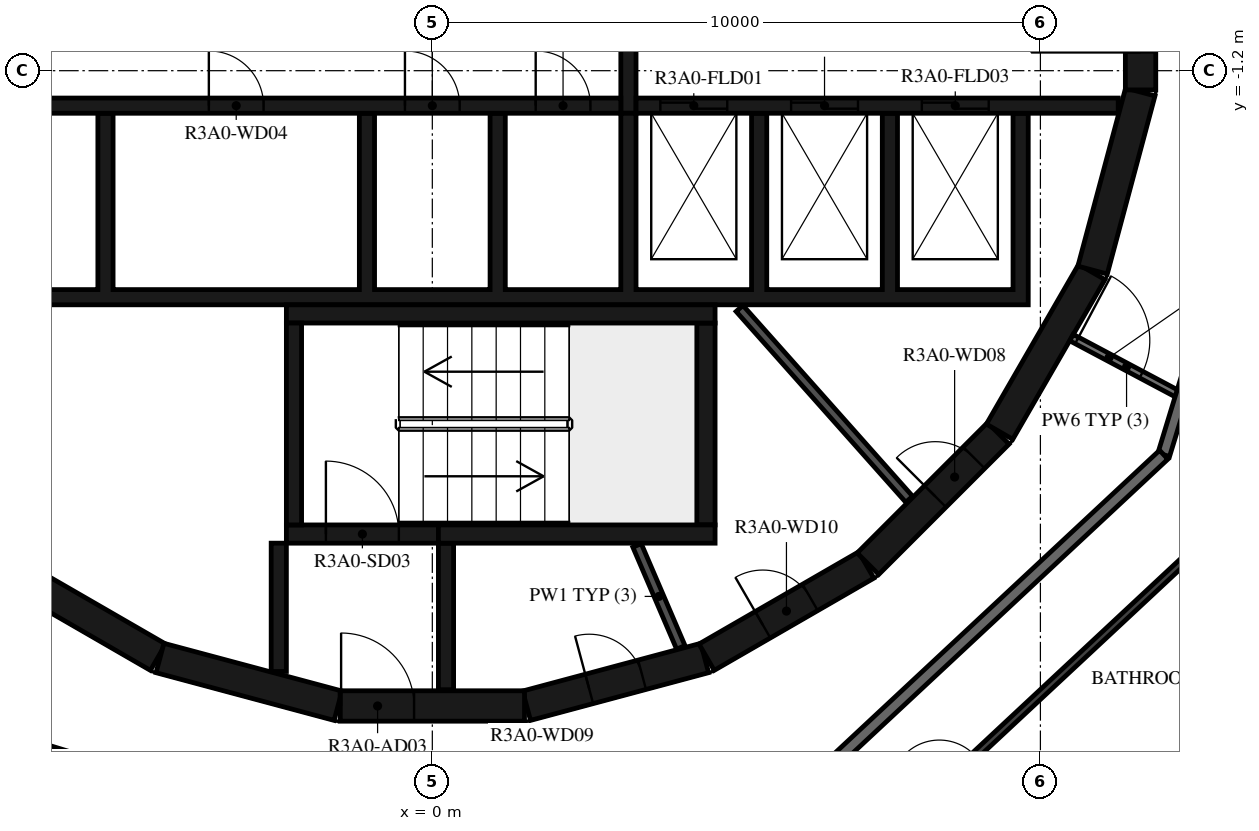
"""IFC4 building model, lengths in metres.
Left out: names, types, materials, properties, quantities, classifications, styles, units other than length and angle.
Written with IfcOpenShell. Run it as: python <this file> out.ifc"""

import sys

from ifc_helpers import new_model, si_unit, direction, frame, frame_2d, origin, place, context, subcontext, project, spatial, polyline, rectangle, outline, extrude, element, fill, save


model = new_model("IFC4")
c1 = context("Model", 3, precision=1e-05, world=origin(), true_north=direction((0.0, 1.0)))
c2 = subcontext(c1, "Body", "Model", "MODEL_VIEW")
j1 = project(units=[si_unit("LENGTHUNIT", "METRE"), si_unit("PLANEANGLEUNIT", "RADIAN")], contexts=[c1])
p1 = place(None, origin())
s1 = spatial("IfcSite", under=j1, at=p1, CompositionType="ELEMENT")
p2 = place(p1, origin())
s2 = spatial("IfcBuilding", under=s1, at=p2, CompositionType="ELEMENT")
p3 = place(p2, frame((0.0, 0.0, 120.4)))
s3 = spatial("IfcBuildingStorey", under=s2, at=p3, CompositionType="ELEMENT", Elevation=120.4)
p4 = place(p3, frame((1.55, -11.643, 0.0), z_axis=(0.0, 0.0, 1.0), x_axis=(0.965948410781, 0.258734743916, 0.0)))
e1 = element("IfcWall", 1, at=p4, inside=s3, PredefinedType="SHEAR", context=c2, shape_type="SweptSolid", body=[
    extrude(rectangle(XDim=3.033, YDim=0.5, at=frame_2d((1.516, 0.0))), origin(), (0.0, 0.0, 1.0), 3.12),
])
p5 = place(p4, frame((1.066, 0.0, 0.0)))
e2 = element("IfcOpeningElement", 2, at=p5, cuts=e1, PredefinedType="OPENING", context=c2, shape_type="SweptSolid", body=[
    extrude(rectangle(XDim=0.9, YDim=2.1, at=frame_2d((0.45, 1.05))), frame((0.0, 0.26, 0.0), z_axis=(0.0, -1.0, 0.0), x_axis=(1.0, 0.0, 0.0)), (0.0, 0.0, 1.0), 0.52),
])
p6 = place(p3, frame((4.51, -10.845, 0.0), z_axis=(0.0, 0.0, 1.0), x_axis=(0.865975092491, 0.500087131594, 0.0)))
e3 = element("IfcWall", 3, at=p6, inside=s3, PredefinedType="SHEAR", context=c2, shape_type="SweptSolid", body=[
    extrude(rectangle(XDim=3.033, YDim=0.5, at=frame_2d((1.516, 0.0))), origin(), (0.0, 0.0, 1.0), 3.12),
])
p7 = place(p6, frame((1.066, 0.0, 0.0)))
e4 = element("IfcOpeningElement", 4, at=p7, cuts=e3, PredefinedType="OPENING", context=c2, shape_type="SweptSolid", body=[
    extrude(rectangle(XDim=0.9, YDim=2.1, at=frame_2d((0.45, 1.05))), frame((0.0, 0.26, 0.0), z_axis=(0.0, -1.0, 0.0), x_axis=(1.0, 0.0, 0.0)), (0.0, 0.0, 1.0), 0.52),
])
p8 = place(p3, frame((7.164, -9.308, 0.0), z_axis=(0.0, 0.0, 1.0), x_axis=(0.707106781187, 0.707106781187, 0.0)))
e5 = element("IfcWall", 5, at=p8, inside=s3, PredefinedType="SHEAR", context=c2, shape_type="SweptSolid", body=[
    extrude(rectangle(XDim=3.032, YDim=0.5, at=frame_2d((1.516, 0.0))), origin(), (0.0, 0.0, 1.0), 3.12),
])
p9 = place(p8, frame((1.566, 0.0, 0.0)))
e6 = element("IfcOpeningElement", 6, at=p9, cuts=e5, PredefinedType="OPENING", context=c2, shape_type="SweptSolid", body=[
    extrude(rectangle(XDim=0.9, YDim=2.1, at=frame_2d((0.45, 1.05))), frame((0.0, 0.26, 0.0), z_axis=(0.0, -1.0, 0.0), x_axis=(1.0, 0.0, 0.0)), (0.0, 0.0, 1.0), 0.52),
])
for number, where, z_axis, x_axis in (
    (7, (9.329, -7.137, 0.0), (0.0, 0.0, 1.0), (0.5, 0.866, 0.0)),
    (8, (10.858, -4.479, 0.0), (0.0, 0.0, 1.0), (0.259, 0.966, 0.0)),
):
    element("IfcWall", number, at=place(p3, frame(where, z_axis=z_axis, x_axis=x_axis)), inside=s3, PredefinedType="SHEAR", context=c2, shape_type="SweptSolid", body=[
        extrude(rectangle(XDim=3.033, YDim=0.5, at=frame_2d((1.516, 0.0))), origin(), (0.0, 0.0, 1.0), 3.12),
    ])
p10 = place(p3, frame((11.647, -1.516, 0.0), z_axis=(0.0, 0.0, 1.0), x_axis=(0.0, 1.0, 0.0)))
e9 = element("IfcWall", 9, at=p10, inside=s3, PredefinedType="SHEAR", context=c2, shape_type="SweptSolid", body=[
    extrude(rectangle(XDim=3.033, YDim=0.5, at=frame_2d((1.516, 0.0))), origin(), (0.0, 0.0, 1.0), 3.12),
])
p11 = place(p10, frame((0.616, 0.0, 0.0)))
e10 = element("IfcOpeningElement", 10, at=p11, cuts=e9, PredefinedType="OPENING", context=c2, shape_type="SweptSolid", body=[
    extrude(rectangle(XDim=1.8, YDim=2.1, at=frame_2d((0.9, 1.05))), frame((0.0, 0.26, 0.0), z_axis=(0.0, -1.0, 0.0), x_axis=(1.0, 0.0, 0.0)), (0.0, 0.0, 1.0), 0.52),
])
for number, where, z_axis, x_axis in (
    (11, (-7.137, -9.329, 0.0), (0.0, 0.0, 1.0), (0.866, -0.5, 0.0)),
    (12, (-4.479, -10.858, 0.0), (0.0, 0.0, 1.0), (0.966, -0.259, 0.0)),
):
    element("IfcWall", number, at=place(p3, frame(where, z_axis=z_axis, x_axis=x_axis)), inside=s3, PredefinedType="SHEAR", context=c2, shape_type="SweptSolid", body=[
        extrude(rectangle(XDim=3.033, YDim=0.5, at=frame_2d((1.516, 0.0))), origin(), (0.0, 0.0, 1.0), 3.12),
    ])
p12 = place(p3, frame((-1.516, -11.647, 0.0), z_axis=(0.0, 0.0, 1.0), x_axis=(1.0, 0.0, 0.0)))
e13 = element("IfcWall", 13, at=p12, inside=s3, PredefinedType="SHEAR", context=c2, shape_type="SweptSolid", body=[
    extrude(rectangle(XDim=3.033, YDim=0.5, at=frame_2d((1.516, 0.0))), origin(), (0.0, 0.0, 1.0), 3.12),
])
p13 = place(p12, frame((0.016, 0.0, 0.0)))
e14 = element("IfcOpeningElement", 14, at=p13, cuts=e13, PredefinedType="OPENING", context=c2, shape_type="SweptSolid", body=[
    extrude(rectangle(XDim=1.2, YDim=2.1, at=frame_2d((0.6, 1.05))), frame((0.0, 0.26, 0.0), z_axis=(0.0, -1.0, 0.0), x_axis=(1.0, 0.0, 0.0)), (0.0, 0.0, 1.0), 0.52),
])
p14 = place(p3, frame((-2.275, -8.67, 0.0), z_axis=(0.0, 0.0, 1.0), x_axis=(0.0, 1.0, 0.0)))
e15 = element("IfcWall", 15, at=p14, inside=s3, PredefinedType="SHEAR", context=c2, shape_type="SweptSolid", body=[
    extrude(rectangle(XDim=3.32, YDim=0.25, at=frame_2d((1.66, 0.0))), origin(), (0.0, 0.0, 1.0), 3.12),
])
p15 = place(p3, frame((-2.4, -5.2, 0.0), z_axis=(0.0, 0.0, 1.0), x_axis=(1.0, 0.0, 0.0)))
e16 = element("IfcWall", 16, at=p15, inside=s3, PredefinedType="SHEAR", context=c2, shape_type="SweptSolid", body=[
    extrude(rectangle(XDim=7.05, YDim=0.3, at=frame_2d((3.525, 0.0))), origin(), (0.0, 0.0, 1.0), 3.12),
])
p16 = place(p3, frame((4.5, -8.67, 0.0), z_axis=(0.0, 0.0, 1.0), x_axis=(0.0, 1.0, 0.0)))
e17 = element("IfcWall", 17, at=p16, inside=s3, PredefinedType="SHEAR", context=c2, shape_type="SweptSolid", body=[
    extrude(rectangle(XDim=3.32, YDim=0.3, at=frame_2d((1.66, 0.0))), origin(), (0.0, 0.0, 1.0), 3.12),
])
p17 = place(p3, frame((0.1, -8.82, 0.0), z_axis=(0.0, 0.0, 1.0), x_axis=(1.0, 0.0, 0.0)))
e18 = element("IfcWall", 18, at=p17, inside=s3, PredefinedType="SHEAR", context=c2, shape_type="SweptSolid", body=[
    extrude(rectangle(XDim=4.55, YDim=0.3, at=frame_2d((2.275, 0.0))), origin(), (0.0, 0.0, 1.0), 3.12),
])
p18 = place(p3, frame((-2.4, -8.82, 0.0), z_axis=(0.0, 0.0, 1.0), x_axis=(1.0, 0.0, 0.0)))
e19 = element("IfcWall", 19, at=p18, inside=s3, PredefinedType="SHEAR", context=c2, shape_type="SweptSolid", body=[
    extrude(rectangle(XDim=2.5, YDim=0.3, at=frame_2d((1.25, 0.0))), origin(), (0.0, 0.0, 1.0), 3.12),
])
p19 = place(p18, frame((0.65, 0.0, 0.0)))
e20 = element("IfcOpeningElement", 20, at=p19, cuts=e19, PredefinedType="OPENING", context=c2, shape_type="SweptSolid", body=[
    extrude(rectangle(XDim=1.2, YDim=2.1, at=frame_2d((0.6, 1.05))), frame((0.0, 0.16, 0.0), z_axis=(0.0, -1.0, 0.0), x_axis=(1.0, 0.0, 0.0)), (0.0, 0.0, 1.0), 0.32),
])
p20 = place(p3, frame((-2.525, -8.97, 0.0), z_axis=(0.0, 0.0, 1.0), x_axis=(0.0, -1.0, 0.0)))
e21 = element("IfcWall", 21, at=p20, inside=s3, PredefinedType="SHEAR", context=c2, shape_type="SweptSolid", body=[
    extrude(rectangle(XDim=2.11, YDim=0.25, at=frame_2d((1.055, 0.0))), origin(), (0.0, 0.0, 1.0), 3.12),
])
p21 = place(p3, frame((0.225, -8.97, 0.0), z_axis=(0.0, 0.0, 1.0), x_axis=(0.0, -1.0, 0.0)))
e22 = element("IfcWall", 22, at=p21, inside=s3, PredefinedType="SHEAR", context=c2, shape_type="SweptSolid", body=[
    extrude(rectangle(XDim=2.41, YDim=0.25, at=frame_2d((1.205, 0.0))), origin(), (0.0, 0.0, 1.0), 3.12),
])
p22 = place(p3, origin())
e23 = element("IfcWall", 23, at=p22, inside=s3, PredefinedType="SHEAR", context=c2, shape_type="SweptSolid", body=[
    extrude(outline(polyline([(9.8, -5.05), (9.8, -4.8), (9.8, -1.9), (9.55, -1.9), (9.55, -4.8), (7.65, -4.8), (7.65, -1.9), (7.4, -1.9), (7.4, -4.8), (5.5, -4.8), (5.5, -1.9), (5.25, -1.9), (5.25, -4.8), (3.35, -4.8), (3.35, -1.9), (3.1, -1.9), (3.1, -4.8), (1.2, -4.8), (1.2, -1.9), (0.95, -1.9), (0.95, -4.8), (-0.95, -4.8), (-0.95, -1.9), (-1.2, -1.9), (-1.2, -4.8), (-5.25, -4.8), (-5.25, -1.9), (-5.5, -1.9), (-5.5, -4.8), (-7.4, -4.8), (-7.4, -1.9), (-7.65, -1.9), (-7.65, -4.8), (-9.55, -4.8), (-9.55, -1.9), (-9.8, -1.9), (-9.8, -4.8), (-9.8, -5.05), (9.8, -5.05)])), origin(), (0.0, 0.0, 1.0), 3.12),
])
p23 = place(p3, frame((-11.28, -1.775, 0.0), z_axis=(0.0, 0.0, 1.0), x_axis=(1.0, 0.0, 0.0)))
e24 = element("IfcWall", 24, at=p23, inside=s3, PredefinedType="SHEAR", context=c2, shape_type="SweptSolid", body=[
    extrude(rectangle(XDim=14.38, YDim=0.25, at=frame_2d((7.19, 0.0))), origin(), (0.0, 0.0, 1.0), 3.12),
])
p24 = place(p23, frame((7.605, 0.0, 0.0)))
e25 = element("IfcOpeningElement", 25, at=p24, cuts=e24, PredefinedType="OPENING", context=c2, shape_type="SweptSolid", body=[
    extrude(rectangle(XDim=0.9, YDim=2.1, at=frame_2d((0.45, 1.05))), frame((0.0, 0.135, 0.0), z_axis=(0.0, -1.0, 0.0), x_axis=(1.0, 0.0, 0.0)), (0.0, 0.0, 1.0), 0.27),
])
p25 = place(p23, frame((10.83, 0.0, 0.0)))
e26 = element("IfcOpeningElement", 26, at=p25, cuts=e24, PredefinedType="OPENING", context=c2, shape_type="SweptSolid", body=[
    extrude(rectangle(XDim=0.9, YDim=2.1, at=frame_2d((0.45, 1.05))), frame((0.0, 0.135, 0.0), z_axis=(0.0, -1.0, 0.0), x_axis=(1.0, 0.0, 0.0)), (0.0, 0.0, 1.0), 0.27),
])
p26 = place(p23, frame((12.98, 0.0, 0.0)))
e27 = element("IfcOpeningElement", 27, at=p26, cuts=e24, PredefinedType="OPENING", context=c2, shape_type="SweptSolid", body=[
    extrude(rectangle(XDim=0.9, YDim=2.1, at=frame_2d((0.45, 1.05))), frame((0.0, 0.135, 0.0), z_axis=(0.0, -1.0, 0.0), x_axis=(1.0, 0.0, 0.0)), (0.0, 0.0, 1.0), 0.27),
])
p27 = place(p3, frame((3.35, -1.775, 0.0), z_axis=(0.0, 0.0, 1.0), x_axis=(1.0, 0.0, 0.0)))
e28 = element("IfcWall", 28, at=p27, inside=s3, PredefinedType="SHEAR", context=c2, shape_type="SweptSolid", body=[
    extrude(rectangle(XDim=7.93, YDim=0.25, at=frame_2d((3.965, 0.0))), origin(), (0.0, 0.0, 1.0), 3.12),
])
p28 = place(p27, frame((0.4, 0.0, 0.0)))
e29 = element("IfcOpeningElement", 29, at=p28, cuts=e28, PredefinedType="OPENING", context=c2, shape_type="SweptSolid", body=[
    extrude(rectangle(XDim=1.1, YDim=2.4, at=frame_2d((0.55, 1.2))), frame((0.0, 0.135, 0.0), z_axis=(0.0, -1.0, 0.0), x_axis=(1.0, 0.0, 0.0)), (0.0, 0.0, 1.0), 0.27),
])
p29 = place(p27, frame((2.55, 0.0, 0.0)))
e30 = element("IfcOpeningElement", 30, at=p29, cuts=e28, PredefinedType="OPENING", context=c2, shape_type="SweptSolid", body=[
    extrude(rectangle(XDim=1.1, YDim=2.4, at=frame_2d((0.55, 1.2))), frame((0.0, 0.135, 0.0), z_axis=(0.0, -1.0, 0.0), x_axis=(1.0, 0.0, 0.0)), (0.0, 0.0, 1.0), 0.27),
])
p30 = place(p27, frame((4.7, 0.0, 0.0)))
e31 = element("IfcOpeningElement", 31, at=p30, cuts=e28, PredefinedType="OPENING", context=c2, shape_type="SweptSolid", body=[
    extrude(rectangle(XDim=1.1, YDim=2.4, at=frame_2d((0.55, 1.2))), frame((0.0, 0.135, 0.0), z_axis=(0.0, -1.0, 0.0), x_axis=(1.0, 0.0, 0.0)), (0.0, 0.0, 1.0), 0.27),
])
p31 = place(p3, frame((3.225, -1.9, 0.0), z_axis=(0.0, 0.0, 1.0), x_axis=(0.0, 1.0, 0.0)))
e32 = element("IfcWall", 32, at=p31, inside=s3, PredefinedType="SHEAR", context=c2, shape_type="SweptSolid", body=[
    extrude(rectangle(XDim=3.8, YDim=0.25, at=frame_2d((1.9, 0.0))), origin(), (0.0, 0.0, 1.0), 3.12),
])
p32 = place(p3, frame((7.842, -8.248, 0.0), z_axis=(0.0, 0.0, 1.0), x_axis=(-0.66446128181, 0.747322691329, 0.0)))
e33 = element("IfcWall", 33, at=p32, inside=s3, PredefinedType="PARTITIONING", context=c2, shape_type="SweptSolid", body=[
    extrude(rectangle(XDim=4.198, YDim=0.15, at=frame_2d((2.099, 0.0))), origin(), (0.0, 0.0, 1.0), 3.12),
])
p33 = place(p3, frame((3.367, -9.007, 0.0), z_axis=(0.0, 0.0, 1.0), x_axis=(0.394387482265, -0.918944238696, 0.0)))
e34 = element("IfcWall", 34, at=p33, inside=s3, PredefinedType="PARTITIONING", context=c2, shape_type="SweptSolid", body=[
    extrude(rectangle(XDim=1.825, YDim=0.15, at=frame_2d((0.913, 0.0))), origin(), (0.0, 0.0, 1.0), 3.12),
])
p34 = place(p3, frame((10.511, -5.589, 0.0), z_axis=(0.0, 0.0, 1.0), x_axis=(0.882987820808, -0.469395897196, 0.0)))
e35 = element("IfcWall", 35, at=p34, inside=s3, PredefinedType="PARTITIONING", context=c2, shape_type="SweptSolid", body=[
    extrude(rectangle(XDim=2.052, YDim=0.12, at=frame_2d((1.026, 0.0))), origin(), (0.0, 0.0, 1.0), 3.12),
])
p35 = place(p34, frame((0.1, 0.0, 0.0)))
e36 = element("IfcOpeningElement", 36, at=p35, cuts=e35, PredefinedType="OPENING", context=c2, shape_type="SweptSolid", body=[
    extrude(rectangle(XDim=1.2, YDim=2.1, at=frame_2d((0.6, 1.05))), frame((0.0, 0.07, 0.0), z_axis=(0.0, -1.0, 0.0), x_axis=(1.0, 0.0, 0.0)), (0.0, 0.0, 1.0), 0.14),
])
p36 = place(p3, frame((12.028, -7.516, 0.0), z_axis=(0.0, 0.0, 1.0), x_axis=(0.292365533182, 0.956306642771, 0.0)))
e37 = element("IfcWall", 37, at=p36, inside=s3, PredefinedType="STANDARD", context=c2, shape_type="SweptSolid", body=[
    extrude(rectangle(XDim=7.342, YDim=0.2, at=frame_2d((3.671, 0.0))), origin(), (0.0, 0.0, 1.0), 3.12),
])
p37 = place(p3, frame((-7.516, -12.028, 0.0), z_axis=(0.0, 0.0, 1.0), x_axis=(0.956306642771, -0.292365533182, 0.0)))
e38 = element("IfcWall", 38, at=p37, inside=s3, PredefinedType="STANDARD", context=c2, shape_type="SweptSolid", body=[
    extrude(rectangle(XDim=7.342, YDim=0.2, at=frame_2d((3.671, 0.0))), origin(), (0.0, 0.0, 1.0), 3.12),
])
p38 = place(p37, frame((5.745, 0.0, 0.0)))
e39 = element("IfcOpeningElement", 39, at=p38, cuts=e38, PredefinedType="OPENING", context=c2, shape_type="SweptSolid", body=[
    extrude(rectangle(XDim=1.0, YDim=2.1, at=frame_2d((0.5, 1.05))), frame((0.0, 0.11, 0.0), z_axis=(0.0, -1.0, 0.0), x_axis=(1.0, 0.0, 0.0)), (0.0, 0.0, 1.0), 0.22),
])
p39 = place(p3, frame((6.659, -12.523, 0.0), z_axis=(0.0, 0.0, 1.0), x_axis=(0.731350455479, 0.682001841105, 0.0)))
e40 = element("IfcWall", 40, at=p39, inside=s3, PredefinedType="STANDARD", context=c2, shape_type="SweptSolid", body=[
    extrude(rectangle(XDim=7.342, YDim=0.2, at=frame_2d((3.671, 0.0))), origin(), (0.0, 0.0, 1.0), 3.12),
])
p40 = place(p3, frame((7.388, -13.894, 0.0), z_axis=(0.0, 0.0, 1.0), x_axis=(0.731339966659, 0.682013088707, 0.0)))
e41 = element("IfcWall", 41, at=p40, inside=s3, PredefinedType="PARTITIONING", context=c2, shape_type="SweptSolid", body=[
    extrude(rectangle(XDim=6.899, YDim=0.12, at=frame_2d((3.45, 0.0))), origin(), (0.0, 0.0, 1.0), 3.12),
])
p41 = place(p40, frame((1.3, 0.0, 0.0)))
e42 = element("IfcOpeningElement", 42, at=p41, cuts=e41, PredefinedType="OPENING", context=c2, shape_type="SweptSolid", body=[
    extrude(rectangle(XDim=0.8, YDim=2.1, at=frame_2d((0.4, 1.05))), frame((0.0, 0.07, 0.0), z_axis=(0.0, -1.0, 0.0), x_axis=(1.0, 0.0, 0.0)), (0.0, 0.0, 1.0), 0.14),
])
p42 = place(p3, frame((7.312, -14.005, 0.0), z_axis=(0.0, 0.0, 1.0), x_axis=(0.974367924791, 0.224960323474, 0.0)))
e43 = element("IfcWall", 43, at=p42, inside=s3, PredefinedType="PARTITIONING", context=c2, shape_type="SweptSolid", body=[
    extrude(rectangle(XDim=14.679, YDim=0.12, at=frame_2d((7.34, 0.0))), origin(), (0.0, 0.0, 1.0), 3.12),
])
p43 = place(p42, frame((6.433, 0.0, 0.0)))
e44 = element("IfcOpeningElement", 44, at=p43, cuts=e43, PredefinedType="OPENING", context=c2, shape_type="SweptSolid", body=[
    extrude(rectangle(XDim=0.9, YDim=2.1, at=frame_2d((0.45, 1.05))), frame((0.0, 0.07, 0.0), z_axis=(0.0, -1.0, 0.0), x_axis=(1.0, 0.0, 0.0)), (0.0, 0.0, 1.0), 0.14),
])
p44 = place(p42, frame((12.812, 0.0, 0.0)))
e45 = element("IfcOpeningElement", 45, at=p44, cuts=e43, PredefinedType="OPENING", context=c2, shape_type="SweptSolid", body=[
    extrude(rectangle(XDim=0.9, YDim=2.1, at=frame_2d((0.45, 1.05))), frame((0.0, 0.07, 0.0), z_axis=(0.0, -1.0, 0.0), x_axis=(1.0, 0.0, 0.0)), (0.0, 0.0, 1.0), 0.14),
])
p45 = place(p19, origin())
e46 = element("IfcDoor", 46, at=p45, inside=s3, OperationType="SINGLE_SWING_LEFT", PredefinedType="DOOR", context=c2, shape_type="SweptSolid", body=[
    extrude(rectangle(XDim=1.2, YDim=2.1, at=frame_2d((0.6, 1.05))), frame((0.0, 0.025, 0.0), z_axis=(0.0, -1.0, 0.0), x_axis=(1.0, 0.0, 0.0)), (0.0, 0.0, 1.0), 0.05),
])
fill(e20, e46)
p46 = place(p13, origin())
e47 = element("IfcDoor", 47, at=p46, inside=s3, OperationType="SINGLE_SWING_RIGHT", PredefinedType="DOOR", context=c2, shape_type="SweptSolid", body=[
    extrude(rectangle(XDim=1.2, YDim=2.1, at=frame_2d((0.6, 1.05))), frame((0.0, 0.025, 0.0), z_axis=(0.0, -1.0, 0.0), x_axis=(1.0, 0.0, 0.0)), (0.0, 0.0, 1.0), 0.05),
])
fill(e14, e47)
p47 = place(p11, origin())
e48 = element("IfcDoor", 48, at=p47, inside=s3, OperationType="DOUBLE_DOOR_SINGLE_SWING", PredefinedType="DOOR", context=c2, shape_type="SweptSolid", body=[
    extrude(rectangle(XDim=1.8, YDim=2.1, at=frame_2d((0.9, 1.05))), frame((0.0, 0.025, 0.0), z_axis=(0.0, -1.0, 0.0), x_axis=(1.0, 0.0, 0.0)), (0.0, 0.0, 1.0), 0.05),
])
fill(e10, e48)
p48 = place(p28, origin())
e49 = element("IfcDoor", 49, at=p48, inside=s3, OperationType="DOUBLE_DOOR_SLIDING", PredefinedType="DOOR", context=c2, shape_type="SweptSolid", body=[
    extrude(rectangle(XDim=1.1, YDim=2.4, at=frame_2d((0.55, 1.2))), frame((0.0, 0.025, 0.0), z_axis=(0.0, -1.0, 0.0), x_axis=(1.0, 0.0, 0.0)), (0.0, 0.0, 1.0), 0.05),
])
fill(e29, e49)
p49 = place(p29, origin())
e50 = element("IfcDoor", 50, at=p49, inside=s3, OperationType="DOUBLE_DOOR_SLIDING", PredefinedType="DOOR", context=c2, shape_type="SweptSolid", body=[
    extrude(rectangle(XDim=1.1, YDim=2.4, at=frame_2d((0.55, 1.2))), frame((0.0, 0.025, 0.0), z_axis=(0.0, -1.0, 0.0), x_axis=(1.0, 0.0, 0.0)), (0.0, 0.0, 1.0), 0.05),
])
fill(e30, e50)
p50 = place(p30, origin())
e51 = element("IfcDoor", 51, at=p50, inside=s3, OperationType="DOUBLE_DOOR_SLIDING", PredefinedType="DOOR", context=c2, shape_type="SweptSolid", body=[
    extrude(rectangle(XDim=1.1, YDim=2.4, at=frame_2d((0.55, 1.2))), frame((0.0, 0.025, 0.0), z_axis=(0.0, -1.0, 0.0), x_axis=(1.0, 0.0, 0.0)), (0.0, 0.0, 1.0), 0.05),
])
fill(e31, e51)
p51 = place(p24, origin())
e52 = element("IfcDoor", 52, at=p51, inside=s3, OperationType="SINGLE_SWING_LEFT", PredefinedType="DOOR", context=c2, shape_type="SweptSolid", body=[
    extrude(rectangle(XDim=0.9, YDim=2.1, at=frame_2d((0.45, 1.05))), frame((0.0, 0.025, 0.0), z_axis=(0.0, -1.0, 0.0), x_axis=(1.0, 0.0, 0.0)), (0.0, 0.0, 1.0), 0.05),
])
fill(e25, e52)
p52 = place(p25, origin())
e53 = element("IfcDoor", 53, at=p52, inside=s3, OperationType="SINGLE_SWING_RIGHT", PredefinedType="DOOR", context=c2, shape_type="SweptSolid", body=[
    extrude(rectangle(XDim=0.9, YDim=2.1, at=frame_2d((0.45, 1.05))), frame((0.0, 0.025, 0.0), z_axis=(0.0, -1.0, 0.0), x_axis=(1.0, 0.0, 0.0)), (0.0, 0.0, 1.0), 0.05),
])
fill(e26, e53)
p53 = place(p26, origin())
e54 = element("IfcDoor", 54, at=p53, inside=s3, OperationType="SINGLE_SWING_LEFT", PredefinedType="DOOR", context=c2, shape_type="SweptSolid", body=[
    extrude(rectangle(XDim=0.9, YDim=2.1, at=frame_2d((0.45, 1.05))), frame((0.0, 0.025, 0.0), z_axis=(0.0, -1.0, 0.0), x_axis=(1.0, 0.0, 0.0)), (0.0, 0.0, 1.0), 0.05),
])
fill(e27, e54)
p54 = place(p9, origin())
e55 = element("IfcDoor", 55, at=p54, inside=s3, OperationType="SINGLE_SWING_LEFT", PredefinedType="DOOR", context=c2, shape_type="SweptSolid", body=[
    extrude(rectangle(XDim=0.9, YDim=2.1, at=frame_2d((0.45, 1.05))), frame((0.0, 0.025, 0.0), z_axis=(0.0, -1.0, 0.0), x_axis=(1.0, 0.0, 0.0)), (0.0, 0.0, 1.0), 0.05),
])
fill(e6, e55)
p55 = place(p5, origin())
e56 = element("IfcDoor", 56, at=p55, inside=s3, OperationType="SINGLE_SWING_RIGHT", PredefinedType="DOOR", context=c2, shape_type="SweptSolid", body=[
    extrude(rectangle(XDim=0.9, YDim=2.1, at=frame_2d((0.45, 1.05))), frame((0.0, 0.025, 0.0), z_axis=(0.0, -1.0, 0.0), x_axis=(1.0, 0.0, 0.0)), (0.0, 0.0, 1.0), 0.05),
])
fill(e2, e56)
p56 = place(p7, origin())
e57 = element("IfcDoor", 57, at=p56, inside=s3, OperationType="SINGLE_SWING_LEFT", PredefinedType="DOOR", context=c2, shape_type="SweptSolid", body=[
    extrude(rectangle(XDim=0.9, YDim=2.1, at=frame_2d((0.45, 1.05))), frame((0.0, 0.025, 0.0), z_axis=(0.0, -1.0, 0.0), x_axis=(1.0, 0.0, 0.0)), (0.0, 0.0, 1.0), 0.05),
])
fill(e4, e57)
p57 = place(p35, origin())
e58 = element("IfcDoor", 58, at=p57, inside=s3, OperationType="DOUBLE_DOOR_SINGLE_SWING", PredefinedType="DOOR", context=c2, shape_type="SweptSolid", body=[
    extrude(rectangle(XDim=1.2, YDim=2.1, at=frame_2d((0.6, 1.05))), frame((0.0, 0.025, 0.0), z_axis=(0.0, -1.0, 0.0), x_axis=(1.0, 0.0, 0.0)), (0.0, 0.0, 1.0), 0.05),
])
fill(e36, e58)
save(model, sys.argv[1])
